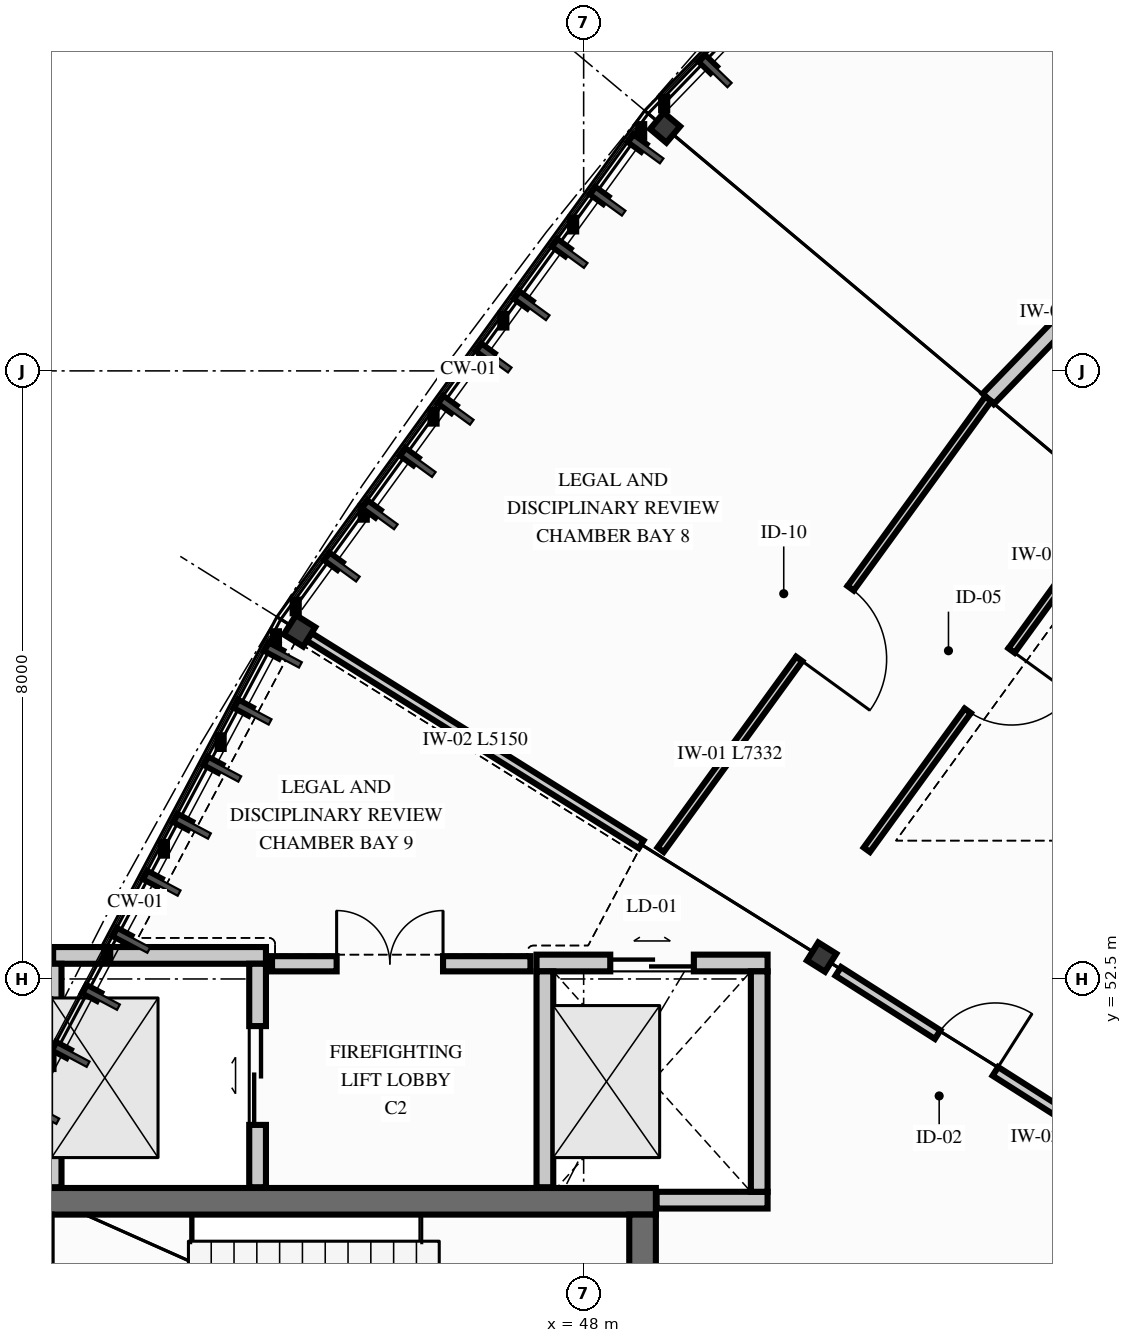
"""IFC4 building model, lengths in metres.
Left out: names, types, materials, properties, quantities, classifications, styles, units other than length and angle.
Written with IfcOpenShell. Run it as: python <this file> out.ifc"""

import sys

from ifc_helpers import new_model, si_unit, direction, frame, frame_2d, origin, origin_2d, place, context, subcontext, project, spatial, rectangle, i_section, extrude, element, fill, save


model = new_model("IFC4")
c1 = context("Model", 3, precision=1e-05, world=origin(), true_north=direction((0.0, 1.0)))
c2 = subcontext(c1, "Body", "Model", "MODEL_VIEW")
j1 = project(units=[si_unit("LENGTHUNIT", "METRE"), si_unit("PLANEANGLEUNIT", "RADIAN")], contexts=[c1])
p1 = place(None, origin())
s1 = spatial("IfcSite", under=j1, at=p1, CompositionType="ELEMENT")
p2 = place(p1, origin())
s2 = spatial("IfcBuilding", under=s1, at=p2, CompositionType="ELEMENT")
p3 = place(p2, frame((0.0, 0.0, 25.5)))
s3 = spatial("IfcBuildingStorey", under=s2, at=p3, CompositionType="ELEMENT", Elevation=25.5)
p4 = place(p3, frame((40.65, 49.575, 0.0), z_axis=(0.0, 0.0, 1.0), x_axis=(1.0, 0.0, 0.0)))
e1 = element("IfcWall", 1, at=p4, inside=s3, PredefinedType="SHEAR", context=c2, shape_type="SweptSolid", body=[
    extrude(rectangle(XDim=8.3, YDim=0.35, at=frame_2d((4.15, 0.0))), origin(), (0.0, 0.0, 1.0), 3.7),
])
p5 = place(p3, frame((48.775, 42.6, 0.0), z_axis=(0.0, 0.0, 1.0), x_axis=(0.0, 1.0, 0.0)))
e2 = element("IfcWall", 2, at=p5, inside=s3, PredefinedType="SHEAR", context=c2, shape_type="SweptSolid", body=[
    extrude(rectangle(XDim=6.8, YDim=0.35, at=frame_2d((3.4, 0.0))), origin(), (0.0, 0.0, 1.0), 3.7),
])
for number, where, z_axis, x_axis in (
    (3, (49.072, 63.699, 0.0), (0.0, 0.0, 1.0), (0.643, 0.766, 0.0)),
    (4, (51.131, 52.787, 0.0), (0.0, 0.0, 1.0), (0.53, 0.848, 0.0)),
):
    element("IfcColumn", number, at=place(p3, frame(where, z_axis=z_axis, x_axis=x_axis)), inside=s3, PredefinedType="COLUMN", context=c2, shape_type="SweptSolid", body=[
        extrude(i_section(OverallWidth=0.28, OverallDepth=0.28, WebThickness=0.01, FlangeThickness=0.018, FilletRadius=0.024, at=origin_2d()), origin(), (0.0, 0.0, 1.0), 3.9),
    ])
p6 = place(p3, frame((44.262, 57.08, 0.0), z_axis=(0.0, 0.0, 1.0), x_axis=(0.529919264233, 0.848048096156, 0.0)))
e5 = element("IfcColumn", 5, at=p6, inside=s3, PredefinedType="COLUMN", context=c2, shape_type="SweptSolid", body=[
    extrude(i_section(OverallWidth=0.3, OverallDepth=0.3, WebThickness=0.011, FlangeThickness=0.019, FilletRadius=0.027, at=origin_2d()), origin(), (0.0, 0.0, 1.0), 3.9),
])
p7 = place(p3, frame((41.02, 52.81, 0.0), z_axis=(0.0, 0.0, 1.0), x_axis=(1.0, 0.0, 0.0)))
e6 = element("IfcWall", 6, at=p7, inside=s3, PredefinedType="PARTITIONING", context=c2, shape_type="SweptSolid", body=[
    extrude(rectangle(XDim=2.8, YDim=0.22, at=frame_2d((1.4, 0.0))), origin(), (0.0, 0.0, 1.0), 3.68),
])
p8 = place(p3, frame((41.02, 49.76, 0.0), z_axis=(0.0, 0.0, 1.0), x_axis=(0.0, 1.0, 0.0)))
e7 = element("IfcWall", 7, at=p8, inside=s3, PredefinedType="PARTITIONING", context=c2, shape_type="SweptSolid", body=[
    extrude(rectangle(XDim=2.94, YDim=0.22, at=frame_2d((1.47, 0.0))), origin(), (0.0, 0.0, 1.0), 3.68),
])
p9 = place(p3, frame((43.71, 49.76, 0.0), z_axis=(0.0, 0.0, 1.0), x_axis=(0.0, 1.0, 0.0)))
e8 = element("IfcWall", 8, at=p9, inside=s3, PredefinedType="PARTITIONING", context=c2, shape_type="SweptSolid", body=[
    extrude(rectangle(XDim=2.94, YDim=0.22, at=frame_2d((1.47, 0.0))), origin(), (0.0, 0.0, 1.0), 3.68),
])
p10 = place(p9, frame((0.82, 0.0, 0.0)))
e9 = element("IfcOpeningElement", 9, at=p10, cuts=e8, PredefinedType="OPENING", context=c2, shape_type="SweptSolid", body=[
    extrude(rectangle(XDim=1.3, YDim=2.2, at=frame_2d((0.65, 1.1))), frame((0.0, 0.12, 0.0), z_axis=(0.0, -1.0, 0.0), x_axis=(1.0, 0.0, 0.0)), (0.0, 0.0, 1.0), 0.24),
])
p11 = place(p3, frame((48.96, 49.59, 0.0), z_axis=(0.0, 0.0, 1.0), x_axis=(1.0, 0.0, 0.0)))
e10 = element("IfcWall", 10, at=p11, inside=s3, PredefinedType="PARTITIONING", context=c2, shape_type="SweptSolid", body=[
    extrude(rectangle(XDim=1.46, YDim=0.22, at=frame_2d((0.73, 0.0))), origin(), (0.0, 0.0, 1.0), 3.68),
])
p12 = place(p3, frame((47.38, 52.71, 0.0), z_axis=(0.0, 0.0, 1.0), x_axis=(1.0, 0.0, 0.0)))
e11 = element("IfcWall", 11, at=p12, inside=s3, PredefinedType="PARTITIONING", context=c2, shape_type="SweptSolid", body=[
    extrude(rectangle(XDim=3.04, YDim=0.22, at=frame_2d((1.52, 0.0))), origin(), (0.0, 0.0, 1.0), 3.68),
])
p13 = place(p12, frame((0.97, 0.0, 0.0)))
e12 = element("IfcOpeningElement", 12, at=p13, cuts=e11, PredefinedType="OPENING", context=c2, shape_type="SweptSolid", body=[
    extrude(rectangle(XDim=1.1, YDim=2.15, at=frame_2d((0.55, 1.075))), frame((0.0, 0.12, 0.0), z_axis=(0.0, -1.0, 0.0), x_axis=(1.0, 0.0, 0.0)), (0.0, 0.0, 1.0), 0.24),
])
p14 = place(p3, frame((47.49, 49.76, 0.0), z_axis=(0.0, 0.0, 1.0), x_axis=(0.0, 1.0, 0.0)))
e13 = element("IfcWall", 13, at=p14, inside=s3, PredefinedType="PARTITIONING", context=c2, shape_type="SweptSolid", body=[
    extrude(rectangle(XDim=2.84, YDim=0.22, at=frame_2d((1.42, 0.0))), origin(), (0.0, 0.0, 1.0), 3.68),
])
p15 = place(p3, frame((50.31, 49.7, 0.0), z_axis=(0.0, 0.0, 1.0), x_axis=(0.0, 1.0, 0.0)))
e14 = element("IfcWall", 14, at=p15, inside=s3, PredefinedType="PARTITIONING", context=c2, shape_type="SweptSolid", body=[
    extrude(rectangle(XDim=2.9, YDim=0.22, at=frame_2d((1.45, 0.0))), origin(), (0.0, 0.0, 1.0), 3.68),
])
p16 = place(p3, frame((43.9, 52.7, 0.0), z_axis=(0.0, 0.0, 1.0), x_axis=(1.0, 0.0, 0.0)))
e15 = element("IfcWall", 15, at=p16, inside=s3, PredefinedType="PARTITIONING", context=c2, shape_type="SweptSolid", body=[
    extrude(rectangle(XDim=3.4, YDim=0.2, at=frame_2d((1.7, 0.0))), origin(), (0.0, 0.0, 1.0), 3.68),
])
p17 = place(p16, frame((0.85, 0.0, 0.0)))
e16 = element("IfcOpeningElement", 16, at=p17, cuts=e15, PredefinedType="OPENING", context=c2, shape_type="SweptSolid", body=[
    extrude(rectangle(XDim=1.4, YDim=2.25, at=frame_2d((0.7, 1.125))), frame((0.0, 0.11, 0.0), z_axis=(0.0, -1.0, 0.0), x_axis=(1.0, 0.0, 0.0)), (0.0, 0.0, 1.0), 0.22),
])
p18 = place(p3, frame((51.35, 52.6, 0.0), z_axis=(0.0, 0.0, 1.0), x_axis=(0.84363284859, -0.536920493909, 0.0)))
e17 = element("IfcWall", 17, at=p18, inside=s3, PredefinedType="PARTITIONING", context=c2, shape_type="SweptSolid", body=[
    extrude(rectangle(XDim=4.563, YDim=0.135, at=frame_2d((2.282, 0.0))), origin(), (0.0, 0.0, 1.0), 3.3),
])
p19 = place(p18, frame((1.55, 0.0, 0.0)))
e18 = element("IfcOpeningElement", 18, at=p19, cuts=e17, PredefinedType="OPENING", context=c2, shape_type="SweptSolid", body=[
    extrude(rectangle(XDim=0.9, YDim=2.1, at=frame_2d((0.45, 1.05))), frame((0.0, 0.077, 0.0), z_axis=(0.0, -1.0, 0.0), x_axis=(1.0, 0.0, 0.0)), (0.0, 0.0, 1.0), 0.155),
])
p20 = place(p3, frame((58.469, 65.461, 0.0), z_axis=(0.0, 0.0, 1.0), x_axis=(-0.694673907436, -0.71932479613, 0.0)))
e19 = element("IfcWall", 19, at=p20, inside=s3, PredefinedType="PARTITIONING", context=c2, shape_type="SweptSolid", body=[
    extrude(rectangle(XDim=7.408, YDim=0.2, at=frame_2d((3.704, 0.0))), origin(), (0.0, 0.0, 1.0), 3.68),
])
p21 = place(p20, frame((3.111, 0.0, 0.0)))
e20 = element("IfcOpeningElement", 20, at=p21, cuts=e19, PredefinedType="OPENING", context=c2, shape_type="SweptSolid", body=[
    extrude(rectangle(XDim=1.12, YDim=2.2, at=frame_2d((0.56, 1.1))), frame((0.0, 0.11, 0.0), z_axis=(0.0, -1.0, 0.0), x_axis=(1.0, 0.0, 0.0)), (0.0, 0.0, 1.0), 0.22),
])
p22 = place(p3, frame((55.008, 58.718, 0.0), z_axis=(0.0, 0.0, 1.0), x_axis=(-0.587773920785, -0.809025227076, 0.0)))
e21 = element("IfcWall", 21, at=p22, inside=s3, PredefinedType="PARTITIONING", context=c2, shape_type="SweptSolid", body=[
    extrude(rectangle(XDim=5.584, YDim=0.1, at=frame_2d((2.792, 0.0))), origin(), (0.0, 0.0, 1.0), 3.68),
])
p23 = place(p22, frame((2.345, 0.0, 0.0)))
e22 = element("IfcOpeningElement", 22, at=p23, cuts=e21, PredefinedType="OPENING", context=c2, shape_type="SweptSolid", body=[
    extrude(rectangle(XDim=0.98, YDim=2.16, at=frame_2d((0.49, 1.08))), frame((0.0, 0.06, 0.0), z_axis=(0.0, -1.0, 0.0), x_axis=(1.0, 0.0, 0.0)), (0.0, 0.0, 1.0), 0.12),
])
p24 = place(p3, frame((53.323, 60.132, 0.0), z_axis=(0.0, 0.0, 1.0), x_axis=(-0.587773694682, -0.809025391344, 0.0)))
e23 = element("IfcWall", 23, at=p24, inside=s3, PredefinedType="PARTITIONING", context=c2, shape_type="SweptSolid", body=[
    extrude(rectangle(XDim=7.333, YDim=0.1, at=frame_2d((3.666, 0.0))), origin(), (0.0, 0.0, 1.0), 3.68),
])
p25 = place(p24, frame((3.08, 0.0, 0.0)))
e24 = element("IfcOpeningElement", 24, at=p25, cuts=e23, PredefinedType="OPENING", context=c2, shape_type="SweptSolid", body=[
    extrude(rectangle(XDim=1.15, YDim=2.2, at=frame_2d((0.575, 1.1))), frame((0.0, 0.06, 0.0), z_axis=(0.0, -1.0, 0.0), x_axis=(1.0, 0.0, 0.0)), (0.0, 0.0, 1.0), 0.12),
])
p26 = place(p3, frame((48.757, 54.271, 0.0), z_axis=(0.0, 0.0, 1.0), x_axis=(-0.848054228257, 0.529909450694, 0.0)))
e25 = element("IfcWall", 25, at=p26, inside=s3, PredefinedType="PARTITIONING", context=c2, shape_type="SweptSolid", body=[
    extrude(rectangle(XDim=5.15, YDim=0.12, at=frame_2d((2.575, 0.0))), origin(), (0.0, 0.0, 1.0), 3.25),
])
p27 = place(p10, origin())
e26 = element("IfcDoor", 26, at=p27, inside=s3, OperationType="DOUBLE_DOOR_SLIDING", PredefinedType="DOOR", context=c2, shape_type="SweptSolid", body=[
    extrude(rectangle(XDim=1.3, YDim=2.2, at=frame_2d((0.65, 1.1))), frame((0.0, 0.025, 0.0), z_axis=(0.0, -1.0, 0.0), x_axis=(1.0, 0.0, 0.0)), (0.0, 0.0, 1.0), 0.05),
])
fill(e9, e26)
p28 = place(p13, origin())
e27 = element("IfcDoor", 27, at=p28, inside=s3, OperationType="DOUBLE_DOOR_SLIDING", PredefinedType="DOOR", context=c2, shape_type="SweptSolid", body=[
    extrude(rectangle(XDim=1.1, YDim=2.15, at=frame_2d((0.55, 1.075))), frame((0.0, 0.025, 0.0), z_axis=(0.0, -1.0, 0.0), x_axis=(1.0, 0.0, 0.0)), (0.0, 0.0, 1.0), 0.05),
])
fill(e12, e27)
p29 = place(p17, origin())
e28 = element("IfcDoor", 28, at=p29, inside=s3, OperationType="DOUBLE_DOOR_SINGLE_SWING", PredefinedType="DOOR", context=c2, shape_type="SweptSolid", body=[
    extrude(rectangle(XDim=1.4, YDim=2.25, at=frame_2d((0.7, 1.125))), frame((0.0, 0.025, 0.0), z_axis=(0.0, -1.0, 0.0), x_axis=(1.0, 0.0, 0.0)), (0.0, 0.0, 1.0), 0.05),
])
fill(e16, e28)
p30 = place(p19, origin())
e29 = element("IfcDoor", 29, at=p30, inside=s3, OperationType="SINGLE_SWING_RIGHT", PredefinedType="DOOR", context=c2, shape_type="SweptSolid", body=[
    extrude(rectangle(XDim=0.9, YDim=2.1, at=frame_2d((0.45, 1.05))), frame((0.0, 0.025, 0.0), z_axis=(0.0, -1.0, 0.0), x_axis=(1.0, 0.0, 0.0)), (0.0, 0.0, 1.0), 0.05),
])
fill(e18, e29)
p31 = place(p23, origin())
e30 = element("IfcDoor", 30, at=p31, inside=s3, OperationType="SINGLE_SWING_LEFT", PredefinedType="DOOR", context=c2, shape_type="SweptSolid", body=[
    extrude(rectangle(XDim=0.98, YDim=2.16, at=frame_2d((0.49, 1.08))), frame((0.0, 0.025, 0.0), z_axis=(0.0, -1.0, 0.0), x_axis=(1.0, 0.0, 0.0)), (0.0, 0.0, 1.0), 0.05),
])
fill(e22, e30)
p32 = place(p25, origin())
e31 = element("IfcDoor", 31, at=p32, inside=s3, OperationType="SINGLE_SWING_RIGHT", PredefinedType="DOOR", context=c2, shape_type="SweptSolid", body=[
    extrude(rectangle(XDim=1.15, YDim=2.2, at=frame_2d((0.575, 1.1))), frame((0.0, 0.025, 0.0), z_axis=(0.0, -1.0, 0.0), x_axis=(1.0, 0.0, 0.0)), (0.0, 0.0, 1.0), 0.05),
])
fill(e24, e31)
save(model, sys.argv[1])
